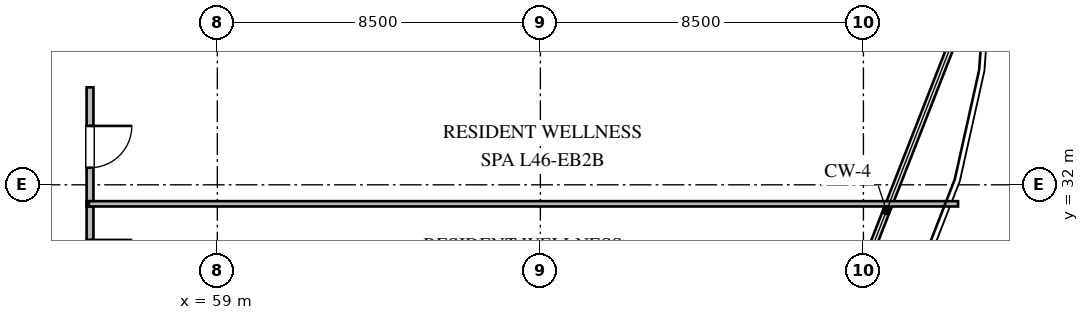
"""IFC4 building model, lengths in metres.
Left out: names, types, materials, properties, quantities, classifications, styles, units other than length and angle.
Written with IfcOpenShell. Run it as: python <this file> out.ifc"""

import sys

from ifc_helpers import new_model, si_unit, direction, frame, frame_2d, origin, place, context, subcontext, project, spatial, rectangle, extrude, element, fill, save


model = new_model("IFC4")
c1 = context("Model", 3, precision=1e-05, world=origin(), true_north=direction((0.0, 1.0)))
c2 = subcontext(c1, "Body", "Model", "MODEL_VIEW")
j1 = project(units=[si_unit("LENGTHUNIT", "METRE"), si_unit("PLANEANGLEUNIT", "RADIAN")], contexts=[c1])
p1 = place(None, origin())
s1 = spatial("IfcSite", under=j1, at=p1, CompositionType="ELEMENT")
p2 = place(p1, origin())
s2 = spatial("IfcBuilding", under=s1, at=p2, CompositionType="ELEMENT")
p3 = place(p2, frame((0.0, 0.0, 174.6)))
s3 = spatial("IfcBuildingStorey", under=s2, at=p3, CompositionType="ELEMENT", Elevation=174.6)
p4 = place(p3, frame((55.65, 31.565, 0.0), z_axis=(0.0, 0.0, 1.0), x_axis=(0.0, -1.0, 0.0)))
e1 = element("IfcWall", 1, at=p4, inside=s3, PredefinedType="PARTITIONING", context=c2, shape_type="SweptSolid", body=[
    extrude(rectangle(XDim=3.13, YDim=0.18, at=frame_2d((1.565, 0.0))), origin(), (0.0, 0.0, 1.0), 3.36),
])
p5 = place(p4, frame((1.015, 0.0, 0.0)))
e2 = element("IfcOpeningElement", 2, at=p5, cuts=e1, PredefinedType="OPENING", context=c2, shape_type="SweptSolid", body=[
    extrude(rectangle(XDim=1.1, YDim=2.1, at=frame_2d((0.55, 1.05))), frame((0.0, 0.1, 0.0), z_axis=(0.0, -1.0, 0.0), x_axis=(1.0, 0.0, 0.0)), (0.0, 0.0, 1.0), 0.2),
])
p6 = place(p3, frame((55.65, 34.565, 0.0), z_axis=(0.0, 0.0, 1.0), x_axis=(0.0, -1.0, 0.0)))
e3 = element("IfcWall", 3, at=p6, inside=s3, PredefinedType="PARTITIONING", context=c2, shape_type="SweptSolid", body=[
    extrude(rectangle(XDim=3.13, YDim=0.18, at=frame_2d((1.565, 0.0))), origin(), (0.0, 0.0, 1.0), 3.36),
])
p7 = place(p6, frame((1.015, 0.0, 0.0)))
e4 = element("IfcOpeningElement", 4, at=p7, cuts=e3, PredefinedType="OPENING", context=c2, shape_type="SweptSolid", body=[
    extrude(rectangle(XDim=1.1, YDim=2.1, at=frame_2d((0.55, 1.05))), frame((0.0, 0.1, 0.0), z_axis=(0.0, -1.0, 0.0), x_axis=(1.0, 0.0, 0.0)), (0.0, 0.0, 1.0), 0.2),
])
p8 = place(p3, frame((55.62, 31.5, 0.0), z_axis=(0.0, 0.0, 1.0), x_axis=(1.0, 0.0, 0.0)))
e5 = element("IfcWall", 5, at=p8, inside=s3, PredefinedType="PARTITIONING", context=c2, shape_type="SweptSolid", body=[
    extrude(rectangle(XDim=22.87, YDim=0.14, at=frame_2d((11.435, 0.0))), origin(), (0.0, 0.0, 1.0), 3.36),
])
p9 = place(p5, origin())
e6 = element("IfcDoor", 6, at=p9, inside=s3, OperationType="SINGLE_SWING_LEFT", PredefinedType="DOOR", context=c2, shape_type="SweptSolid", body=[
    extrude(rectangle(XDim=1.1, YDim=2.1, at=frame_2d((0.55, 1.05))), frame((0.0, 0.025, 0.0), z_axis=(0.0, -1.0, 0.0), x_axis=(1.0, 0.0, 0.0)), (0.0, 0.0, 1.0), 0.05),
])
fill(e2, e6)
p10 = place(p7, origin())
e7 = element("IfcDoor", 7, at=p10, inside=s3, OperationType="SINGLE_SWING_LEFT", PredefinedType="DOOR", context=c2, shape_type="SweptSolid", body=[
    extrude(rectangle(XDim=1.1, YDim=2.1, at=frame_2d((0.55, 1.05))), frame((0.0, 0.025, 0.0), z_axis=(0.0, -1.0, 0.0), x_axis=(1.0, 0.0, 0.0)), (0.0, 0.0, 1.0), 0.05),
])
fill(e4, e7)
save(model, sys.argv[1])
